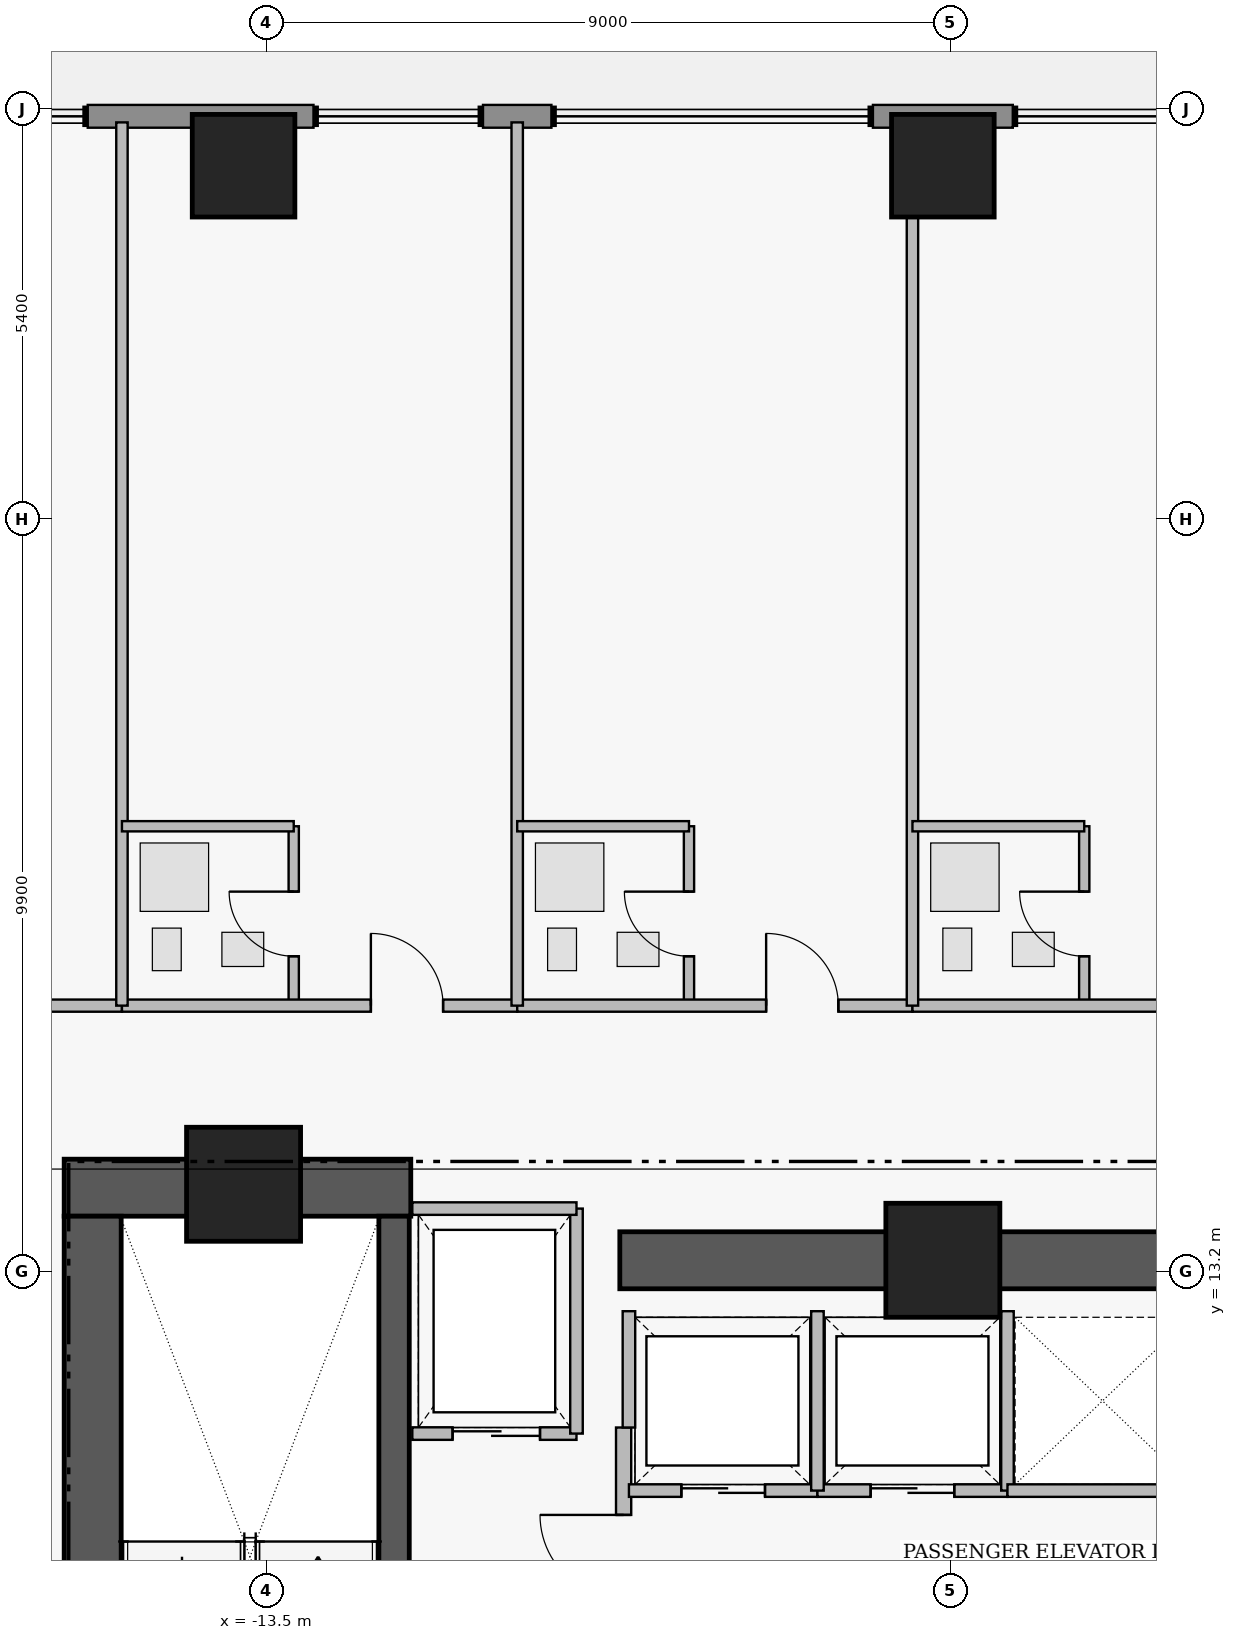
"""IFC4 building model, lengths in metres.
Left out: names, types, materials, properties, quantities, classifications, styles, units other than length and angle.
Written with IfcOpenShell. Run it as: python <this file> out.ifc"""

import sys

from ifc_helpers import new_model, si_unit, direction, frame, frame_2d, origin, origin_2d, place, context, subcontext, project, spatial, rectangle, extrude, element, fill, save


model = new_model("IFC4")
c1 = context("Model", 3, precision=1e-05, world=origin(), true_north=direction((0.0, 1.0)))
c2 = subcontext(c1, "Body", "Model", "MODEL_VIEW")
j1 = project(units=[si_unit("LENGTHUNIT", "METRE"), si_unit("PLANEANGLEUNIT", "RADIAN")], contexts=[c1])
p1 = place(None, origin())
s1 = spatial("IfcSite", under=j1, at=p1, CompositionType="ELEMENT")
p2 = place(p1, origin())
s2 = spatial("IfcBuilding", under=s1, at=p2, CompositionType="ELEMENT")
p3 = place(p2, frame((0.0, 0.0, 106.6)))
s3 = spatial("IfcBuildingStorey", under=s2, at=p3, CompositionType="ELEMENT", Elevation=106.6)
p4 = place(p3, frame((-16.16, 14.305, 0.0), z_axis=(0.0, 0.0, 1.0), x_axis=(1.0, 0.0, 0.0)))
e1 = element("IfcWall", 1, at=p4, inside=s3, PredefinedType="SHEAR", context=c2, shape_type="SweptSolid", body=[
    extrude(rectangle(XDim=4.56, YDim=0.75, at=frame_2d((2.28, 0.0))), origin(), (0.0, 0.0, 1.0), 3.46),
])
p5 = place(p3, frame((-15.785, 4.97, 0.0), z_axis=(0.0, 0.0, 1.0), x_axis=(0.0, 1.0, 0.0)))
e2 = element("IfcWall", 2, at=p5, inside=s3, PredefinedType="SHEAR", context=c2, shape_type="SweptSolid", body=[
    extrude(rectangle(XDim=8.96, YDim=0.75, at=frame_2d((4.48, 0.0))), origin(), (0.0, 0.0, 1.0), 3.46),
])
p6 = place(p3, frame((-8.85, 13.35, 0.0), z_axis=(0.0, 0.0, 1.0), x_axis=(1.0, 0.0, 0.0)))
e3 = element("IfcWall", 3, at=p6, inside=s3, PredefinedType="SHEAR", context=c2, shape_type="SweptSolid", body=[
    extrude(rectangle(XDim=7.6, YDim=0.75, at=frame_2d((3.8, 0.0))), origin(), (0.0, 0.0, 1.0), 3.43),
])
p7 = place(p3, frame((-11.82, 4.97, 0.0), z_axis=(0.0, 0.0, 1.0), x_axis=(0.0, 1.0, 0.0)))
e4 = element("IfcWall", 4, at=p7, inside=s3, PredefinedType="SHEAR", context=c2, shape_type="SweptSolid", body=[
    extrude(rectangle(XDim=8.96, YDim=0.4, at=frame_2d((4.48, 0.0))), origin(), (0.0, 0.0, 1.0), 3.46),
])
p8 = place(p7, frame((0.31, 0.0, 0.0)))
e5 = element("IfcOpeningElement", 5, at=p8, cuts=e4, PredefinedType="OPENING", context=c2, shape_type="SweptSolid", body=[
    extrude(rectangle(XDim=1.12, YDim=2.22, at=frame_2d((0.56, 1.11))), frame((0.0, 0.21, 0.0), z_axis=(0.0, -1.0, 0.0), x_axis=(1.0, 0.0, 0.0)), (0.0, 0.0, 1.0), 0.42),
])
for number, where, z_axis, x_axis in (
    (6, (-13.8, 14.35, 0.0), (0.0, 0.0, 1.0), (1.0, 0.0, 0.0)),
    (7, (-4.6, 13.35, 0.0), (0.0, 0.0, 1.0), (1.0, 0.0, 0.0)),
):
    element("IfcColumn", number, at=place(p3, frame(where, z_axis=z_axis, x_axis=x_axis)), inside=s3, PredefinedType="COLUMN", context=c2, shape_type="SweptSolid", body=[
        extrude(rectangle(XDim=1.5, YDim=1.5, at=origin_2d()), origin(), (0.0, 0.0, 1.0), 3.65),
    ])
for number, where, z_axis, x_axis in (
    (8, (-13.8, 27.75, 0.0), (0.0, 0.0, 1.0), (1.0, 0.0, 0.0)),
    (9, (-4.6, 27.75, 0.0), (0.0, 0.0, 1.0), (1.0, 0.0, 0.0)),
):
    element("IfcColumn", number, at=place(p3, frame(where, z_axis=z_axis, x_axis=x_axis)), inside=s3, PredefinedType="COLUMN", context=c2, shape_type="SweptSolid", body=[
        extrude(rectangle(XDim=1.35, YDim=1.35, at=origin_2d()), origin(), (0.0, 0.0, 1.0), 3.65),
    ])
p9 = place(p3, frame((-15.85, 28.4, 0.0), z_axis=(0.0, 0.0, 1.0), x_axis=(1.0, 0.0, 0.0)))
e10 = element("IfcWall", 10, at=p9, inside=s3, PredefinedType="STANDARD", context=c2, shape_type="SweptSolid", body=[
    extrude(rectangle(XDim=2.97, YDim=0.3, at=frame_2d((1.485, 0.0))), origin(), (0.0, 0.0, 1.0), 3.43),
])
p10 = place(p3, frame((-10.65, 28.4, 0.0), z_axis=(0.0, 0.0, 1.0), x_axis=(1.0, 0.0, 0.0)))
e11 = element("IfcWall", 11, at=p10, inside=s3, PredefinedType="STANDARD", context=c2, shape_type="SweptSolid", body=[
    extrude(rectangle(XDim=0.9, YDim=0.3, at=frame_2d((0.45, 0.0))), origin(), (0.0, 0.0, 1.0), 3.43),
])
p11 = place(p3, frame((-5.52, 28.4, 0.0), z_axis=(0.0, 0.0, 1.0), x_axis=(1.0, 0.0, 0.0)))
e12 = element("IfcWall", 12, at=p11, inside=s3, PredefinedType="STANDARD", context=c2, shape_type="SweptSolid", body=[
    extrude(rectangle(XDim=1.84, YDim=0.3, at=frame_2d((0.92, 0.0))), origin(), (0.0, 0.0, 1.0), 3.43),
])
p12 = place(p3, frame((-8.8, 5.05, 0.0), z_axis=(0.0, 0.0, 1.0), x_axis=(0.0, 1.0, 0.0)))
e13 = element("IfcWall", 13, at=p12, inside=s3, PredefinedType="PARTITIONING", context=c2, shape_type="SweptSolid", body=[
    extrude(rectangle(XDim=6.1, YDim=0.2, at=frame_2d((3.05, 0.0))), origin(), (0.0, 0.0, 1.0), 3.43),
])
p13 = place(p12, frame((0.25, 0.0, 0.0)))
e14 = element("IfcOpeningElement", 14, at=p13, cuts=e13, PredefinedType="OPENING", context=c2, shape_type="SweptSolid", body=[
    extrude(rectangle(XDim=1.1, YDim=2.2, at=frame_2d((0.55, 1.1))), frame((0.0, 0.11, 0.0), z_axis=(0.0, -1.0, 0.0), x_axis=(1.0, 0.0, 0.0)), (0.0, 0.0, 1.0), 0.22),
])
p14 = place(p12, frame((3.85, 0.0, 0.0)))
e15 = element("IfcOpeningElement", 15, at=p14, cuts=e13, PredefinedType="OPENING", context=c2, shape_type="SweptSolid", body=[
    extrude(rectangle(XDim=1.1, YDim=2.2, at=frame_2d((0.55, 1.1))), frame((0.0, 0.11, 0.0), z_axis=(0.0, -1.0, 0.0), x_axis=(1.0, 0.0, 0.0)), (0.0, 0.0, 1.0), 0.22),
])
p15 = place(p3, frame((-11.58, 11.07, 0.0), z_axis=(0.0, 0.0, 1.0), x_axis=(1.0, 0.0, 0.0)))
e16 = element("IfcWall", 16, at=p15, inside=s3, PredefinedType="PARTITIONING", context=c2, shape_type="SweptSolid", body=[
    extrude(rectangle(XDim=2.16, YDim=0.165, at=frame_2d((1.08, 0.0))), origin(), (0.0, 0.0, 1.0), 3.43),
])
p16 = place(p15, frame((0.53, 0.0, 0.0)))
e17 = element("IfcOpeningElement", 17, at=p16, cuts=e16, PredefinedType="OPENING", context=c2, shape_type="SweptSolid", body=[
    extrude(rectangle(XDim=1.15, YDim=2.25, at=frame_2d((0.575, 1.125))), frame((0.0, 0.093, 0.0), z_axis=(0.0, -1.0, 0.0), x_axis=(1.0, 0.0, 0.0)), (0.0, 0.0, 1.0), 0.185),
])
p17 = place(p3, frame((-8.73, 10.32, 0.0), z_axis=(0.0, 0.0, 1.0), x_axis=(1.0, 0.0, 0.0)))
e18 = element("IfcWall", 18, at=p17, inside=s3, PredefinedType="PARTITIONING", context=c2, shape_type="SweptSolid", body=[
    extrude(rectangle(XDim=2.48, YDim=0.165, at=frame_2d((1.24, 0.0))), origin(), (0.0, 0.0, 1.0), 3.43),
])
p18 = place(p17, frame((0.69, 0.0, 0.0)))
e19 = element("IfcOpeningElement", 19, at=p18, cuts=e18, PredefinedType="OPENING", context=c2, shape_type="SweptSolid", body=[
    extrude(rectangle(XDim=1.1, YDim=2.25, at=frame_2d((0.55, 1.125))), frame((0.0, 0.093, 0.0), z_axis=(0.0, -1.0, 0.0), x_axis=(1.0, 0.0, 0.0)), (0.0, 0.0, 1.0), 0.185),
])
p19 = place(p3, frame((-6.25, 10.32, 0.0), z_axis=(0.0, 0.0, 1.0), x_axis=(1.0, 0.0, 0.0)))
e20 = element("IfcWall", 20, at=p19, inside=s3, PredefinedType="PARTITIONING", context=c2, shape_type="SweptSolid", body=[
    extrude(rectangle(XDim=2.5, YDim=0.165, at=frame_2d((1.25, 0.0))), origin(), (0.0, 0.0, 1.0), 3.43),
])
p20 = place(p19, frame((0.7, 0.0, 0.0)))
e21 = element("IfcOpeningElement", 21, at=p20, cuts=e20, PredefinedType="OPENING", context=c2, shape_type="SweptSolid", body=[
    extrude(rectangle(XDim=1.1, YDim=2.25, at=frame_2d((0.55, 1.125))), frame((0.0, 0.093, 0.0), z_axis=(0.0, -1.0, 0.0), x_axis=(1.0, 0.0, 0.0)), (0.0, 0.0, 1.0), 0.185),
])
p21 = place(p3, frame((-20.6, 16.7, 0.0), z_axis=(0.0, 0.0, 1.0), x_axis=(1.0, 0.0, 0.0)))
e22 = element("IfcWall", 22, at=p21, inside=s3, PredefinedType="PARTITIONING", context=c2, shape_type="SweptSolid", body=[
    extrude(rectangle(XDim=5.2, YDim=0.16, at=frame_2d((2.6, 0.0))), origin(), (0.0, 0.0, 1.0), 3.43),
])
p22 = place(p21, frame((3.275, 0.0, 0.0)))
e23 = element("IfcOpeningElement", 23, at=p22, cuts=e22, PredefinedType="OPENING", context=c2, shape_type="SweptSolid", body=[
    extrude(rectangle(XDim=0.95, YDim=2.15, at=frame_2d((0.475, 1.075))), frame((0.0, 0.09, 0.0), z_axis=(0.0, -1.0, 0.0), x_axis=(1.0, 0.0, 0.0)), (0.0, 0.0, 1.0), 0.18),
])
p23 = place(p3, frame((-13.14, 16.7, 0.0), z_axis=(0.0, 0.0, 1.0), x_axis=(0.0, 1.0, 0.0)))
e24 = element("IfcWall", 24, at=p23, inside=s3, PredefinedType="PLUMBINGWALL", context=c2, shape_type="SweptSolid", body=[
    extrude(rectangle(XDim=2.36, YDim=0.135, at=frame_2d((1.18, 0.0))), origin(), (0.0, 0.0, 1.0), 3.43),
])
p24 = place(p23, frame((0.65, 0.0, 0.0)))
e25 = element("IfcOpeningElement", 25, at=p24, cuts=e24, PredefinedType="OPENING", context=c2, shape_type="SweptSolid", body=[
    extrude(rectangle(XDim=0.85, YDim=2.1, at=frame_2d((0.425, 1.05))), frame((0.0, 0.077, 0.0), z_axis=(0.0, -1.0, 0.0), x_axis=(1.0, 0.0, 0.0)), (0.0, 0.0, 1.0), 0.155),
])
p25 = place(p3, frame((-15.4, 16.7, 0.0), z_axis=(0.0, 0.0, 1.0), x_axis=(1.0, 0.0, 0.0)))
e26 = element("IfcWall", 26, at=p25, inside=s3, PredefinedType="PARTITIONING", context=c2, shape_type="SweptSolid", body=[
    extrude(rectangle(XDim=5.2, YDim=0.16, at=frame_2d((2.6, 0.0))), origin(), (0.0, 0.0, 1.0), 2.973),
])
p26 = place(p25, frame((3.275, 0.0, 0.0)))
e27 = element("IfcOpeningElement", 27, at=p26, cuts=e26, PredefinedType="OPENING", context=c2, shape_type="SweptSolid", body=[
    extrude(rectangle(XDim=0.95, YDim=2.15, at=frame_2d((0.475, 1.075))), frame((0.0, 0.09, 0.0), z_axis=(0.0, -1.0, 0.0), x_axis=(1.0, 0.0, 0.0)), (0.0, 0.0, 1.0), 0.18),
])
p27 = place(p3, frame((-7.94, 16.7, 0.0), z_axis=(0.0, 0.0, 1.0), x_axis=(0.0, 1.0, 0.0)))
e28 = element("IfcWall", 28, at=p27, inside=s3, PredefinedType="PLUMBINGWALL", context=c2, shape_type="SweptSolid", body=[
    extrude(rectangle(XDim=2.36, YDim=0.135, at=frame_2d((1.18, 0.0))), origin(), (0.0, 0.0, 1.0), 3.43),
])
p28 = place(p27, frame((0.65, 0.0, 0.0)))
e29 = element("IfcOpeningElement", 29, at=p28, cuts=e28, PredefinedType="OPENING", context=c2, shape_type="SweptSolid", body=[
    extrude(rectangle(XDim=0.85, YDim=2.1, at=frame_2d((0.425, 1.05))), frame((0.0, 0.077, 0.0), z_axis=(0.0, -1.0, 0.0), x_axis=(1.0, 0.0, 0.0)), (0.0, 0.0, 1.0), 0.155),
])
p29 = place(p3, frame((-10.2, 16.7, 0.0), z_axis=(0.0, 0.0, 1.0), x_axis=(1.0, 0.0, 0.0)))
e30 = element("IfcWall", 30, at=p29, inside=s3, PredefinedType="PARTITIONING", context=c2, shape_type="SweptSolid", body=[
    extrude(rectangle(XDim=5.2, YDim=0.16, at=frame_2d((2.6, 0.0))), origin(), (0.0, 0.0, 1.0), 2.973),
])
p30 = place(p29, frame((3.275, 0.0, 0.0)))
e31 = element("IfcOpeningElement", 31, at=p30, cuts=e30, PredefinedType="OPENING", context=c2, shape_type="SweptSolid", body=[
    extrude(rectangle(XDim=0.95, YDim=2.15, at=frame_2d((0.475, 1.075))), frame((0.0, 0.09, 0.0), z_axis=(0.0, -1.0, 0.0), x_axis=(1.0, 0.0, 0.0)), (0.0, 0.0, 1.0), 0.18),
])
p31 = place(p3, frame((-2.74, 16.7, 0.0), z_axis=(0.0, 0.0, 1.0), x_axis=(0.0, 1.0, 0.0)))
e32 = element("IfcWall", 32, at=p31, inside=s3, PredefinedType="PLUMBINGWALL", context=c2, shape_type="SweptSolid", body=[
    extrude(rectangle(XDim=2.36, YDim=0.135, at=frame_2d((1.18, 0.0))), origin(), (0.0, 0.0, 1.0), 3.43),
])
p32 = place(p31, frame((0.65, 0.0, 0.0)))
e33 = element("IfcOpeningElement", 33, at=p32, cuts=e32, PredefinedType="OPENING", context=c2, shape_type="SweptSolid", body=[
    extrude(rectangle(XDim=0.85, YDim=2.1, at=frame_2d((0.425, 1.05))), frame((0.0, 0.077, 0.0), z_axis=(0.0, -1.0, 0.0), x_axis=(1.0, 0.0, 0.0)), (0.0, 0.0, 1.0), 0.155),
])
p33 = place(p3, frame((-5.0, 16.7, 0.0), z_axis=(0.0, 0.0, 1.0), x_axis=(1.0, 0.0, 0.0)))
e34 = element("IfcWall", 34, at=p33, inside=s3, PredefinedType="PARTITIONING", context=c2, shape_type="SweptSolid", body=[
    extrude(rectangle(XDim=5.2, YDim=0.16, at=frame_2d((2.6, 0.0))), origin(), (0.0, 0.0, 1.0), 2.973),
])
p34 = place(p33, frame((3.275, 0.0, 0.0)))
e35 = element("IfcOpeningElement", 35, at=p34, cuts=e34, PredefinedType="OPENING", context=c2, shape_type="SweptSolid", body=[
    extrude(rectangle(XDim=0.95, YDim=2.15, at=frame_2d((0.475, 1.075))), frame((0.0, 0.09, 0.0), z_axis=(0.0, -1.0, 0.0), x_axis=(1.0, 0.0, 0.0)), (0.0, 0.0, 1.0), 0.18),
])
p35 = place(p3, frame((-9.42, 11.07, 0.0), z_axis=(0.0, 0.0, 1.0), x_axis=(0.0, 1.0, 0.0)))
e36 = element("IfcWall", 36, at=p35, inside=s3, PredefinedType="PARTITIONING", context=c2, shape_type="SweptSolid", body=[
    extrude(rectangle(XDim=2.96, YDim=0.165, at=frame_2d((1.48, 0.0))), origin(), (0.0, 0.0, 1.0), 3.43),
])
p36 = place(p3, frame((-11.58, 14.03, 0.0), z_axis=(0.0, 0.0, 1.0), x_axis=(1.0, 0.0, 0.0)))
e37 = element("IfcWall", 37, at=p36, inside=s3, PredefinedType="PARTITIONING", context=c2, shape_type="SweptSolid", body=[
    extrude(rectangle(XDim=2.16, YDim=0.165, at=frame_2d((1.08, 0.0))), origin(), (0.0, 0.0, 1.0), 3.43),
])
p37 = place(p3, frame((-8.73, 11.15, 0.0), z_axis=(0.0, 0.0, 1.0), x_axis=(0.0, 1.0, 0.0)))
e38 = element("IfcWall", 38, at=p37, inside=s3, PredefinedType="PARTITIONING", context=c2, shape_type="SweptSolid", body=[
    extrude(rectangle(XDim=1.53, YDim=0.165, at=frame_2d((0.765, 0.0))), origin(), (0.0, 0.0, 1.0), 3.43),
])
for number, where, z_axis, x_axis in (
    (39, (-6.25, 10.32, 0.0), (0.0, 0.0, 1.0), (0.0, 1.0, 0.0)),
    (40, (-3.75, 10.32, 0.0), (0.0, 0.0, 1.0), (0.0, 1.0, 0.0)),
):
    element("IfcWall", number, at=place(p3, frame(where, z_axis=z_axis, x_axis=x_axis)), inside=s3, PredefinedType="PARTITIONING", context=c2, shape_type="SweptSolid", body=[
        extrude(rectangle(XDim=2.36, YDim=0.165, at=frame_2d((1.18, 0.0))), origin(), (0.0, 0.0, 1.0), 3.43),
    ])
p38 = place(p3, frame((-3.75, 10.32, 0.0), z_axis=(0.0, 0.0, 1.0), x_axis=(1.0, 0.0, 0.0)))
e41 = element("IfcWall", 41, at=p38, inside=s3, PredefinedType="PARTITIONING", context=c2, shape_type="SweptSolid", body=[
    extrude(rectangle(XDim=2.48, YDim=0.165, at=frame_2d((1.24, 0.0))), origin(), (0.0, 0.0, 1.0), 3.43),
])
p39 = place(p3, frame((-15.4, 16.7, 0.0), z_axis=(0.0, 0.0, 1.0), x_axis=(0.0, 1.0, 0.0)))
e42 = element("IfcWall", 42, at=p39, inside=s3, PredefinedType="PARTITIONING", context=c2, shape_type="SweptSolid", body=[
    extrude(rectangle(XDim=11.62, YDim=0.15, at=frame_2d((5.81, 0.0))), origin(), (0.0, 0.0, 1.0), 3.43),
])
p40 = place(p3, frame((-15.4, 19.06, 0.0), z_axis=(0.0, 0.0, 1.0), x_axis=(1.0, 0.0, 0.0)))
e43 = element("IfcWall", 43, at=p40, inside=s3, PredefinedType="PLUMBINGWALL", context=c2, shape_type="SweptSolid", body=[
    extrude(rectangle(XDim=2.26, YDim=0.135, at=frame_2d((1.13, 0.0))), origin(), (0.0, 0.0, 1.0), 2.973),
])
p41 = place(p3, frame((-10.2, 16.7, 0.0), z_axis=(0.0, 0.0, 1.0), x_axis=(0.0, 1.0, 0.0)))
e44 = element("IfcWall", 44, at=p41, inside=s3, PredefinedType="PARTITIONING", context=c2, shape_type="SweptSolid", body=[
    extrude(rectangle(XDim=11.62, YDim=0.15, at=frame_2d((5.81, 0.0))), origin(), (0.0, 0.0, 1.0), 3.43),
])
p42 = place(p3, frame((-10.2, 19.06, 0.0), z_axis=(0.0, 0.0, 1.0), x_axis=(1.0, 0.0, 0.0)))
e45 = element("IfcWall", 45, at=p42, inside=s3, PredefinedType="PLUMBINGWALL", context=c2, shape_type="SweptSolid", body=[
    extrude(rectangle(XDim=2.26, YDim=0.135, at=frame_2d((1.13, 0.0))), origin(), (0.0, 0.0, 1.0), 2.973),
])
p43 = place(p3, frame((-5.0, 16.7, 0.0), z_axis=(0.0, 0.0, 1.0), x_axis=(0.0, 1.0, 0.0)))
e46 = element("IfcWall", 46, at=p43, inside=s3, PredefinedType="PARTITIONING", context=c2, shape_type="SweptSolid", body=[
    extrude(rectangle(XDim=11.62, YDim=0.15, at=frame_2d((5.81, 0.0))), origin(), (0.0, 0.0, 1.0), 2.503),
])
p44 = place(p3, frame((-5.0, 19.06, 0.0), z_axis=(0.0, 0.0, 1.0), x_axis=(1.0, 0.0, 0.0)))
e47 = element("IfcWall", 47, at=p44, inside=s3, PredefinedType="PLUMBINGWALL", context=c2, shape_type="SweptSolid", body=[
    extrude(rectangle(XDim=2.26, YDim=0.135, at=frame_2d((1.13, 0.0))), origin(), (0.0, 0.0, 1.0), 2.973),
])
p45 = place(p14, origin())
e48 = element("IfcDoor", 48, at=p45, inside=s3, OperationType="SINGLE_SWING_RIGHT", PredefinedType="DOOR", context=c2, shape_type="SweptSolid", body=[
    extrude(rectangle(XDim=1.1, YDim=2.2, at=frame_2d((0.55, 1.1))), frame((0.0, 0.025, 0.0), z_axis=(0.0, -1.0, 0.0), x_axis=(1.0, 0.0, 0.0)), (0.0, 0.0, 1.0), 0.05),
])
fill(e15, e48)
p46 = place(p16, origin())
e49 = element("IfcDoor", 49, at=p46, inside=s3, OperationType="SLIDING_TO_LEFT", PredefinedType="DOOR", context=c2, shape_type="SweptSolid", body=[
    extrude(rectangle(XDim=1.15, YDim=2.25, at=frame_2d((0.575, 1.125))), frame((0.0, 0.025, 0.0), z_axis=(0.0, -1.0, 0.0), x_axis=(1.0, 0.0, 0.0)), (0.0, 0.0, 1.0), 0.05),
])
fill(e17, e49)
p47 = place(p18, origin())
e50 = element("IfcDoor", 50, at=p47, inside=s3, OperationType="SLIDING_TO_LEFT", PredefinedType="DOOR", context=c2, shape_type="SweptSolid", body=[
    extrude(rectangle(XDim=1.1, YDim=2.25, at=frame_2d((0.55, 1.125))), frame((0.0, 0.025, 0.0), z_axis=(0.0, -1.0, 0.0), x_axis=(1.0, 0.0, 0.0)), (0.0, 0.0, 1.0), 0.05),
])
fill(e19, e50)
p48 = place(p20, origin())
e51 = element("IfcDoor", 51, at=p48, inside=s3, OperationType="SLIDING_TO_LEFT", PredefinedType="DOOR", context=c2, shape_type="SweptSolid", body=[
    extrude(rectangle(XDim=1.1, YDim=2.25, at=frame_2d((0.55, 1.125))), frame((0.0, 0.025, 0.0), z_axis=(0.0, -1.0, 0.0), x_axis=(1.0, 0.0, 0.0)), (0.0, 0.0, 1.0), 0.05),
])
fill(e21, e51)
p49 = place(p24, origin())
e52 = element("IfcDoor", 52, at=p49, inside=s3, OperationType="SINGLE_SWING_RIGHT", PredefinedType="DOOR", context=c2, shape_type="SweptSolid", body=[
    extrude(rectangle(XDim=0.85, YDim=2.1, at=frame_2d((0.425, 1.05))), frame((0.0, 0.025, 0.0), z_axis=(0.0, -1.0, 0.0), x_axis=(1.0, 0.0, 0.0)), (0.0, 0.0, 1.0), 0.05),
])
fill(e25, e52)
p50 = place(p26, origin())
e53 = element("IfcDoor", 53, at=p50, inside=s3, OperationType="SINGLE_SWING_LEFT", PredefinedType="DOOR", context=c2, shape_type="SweptSolid", body=[
    extrude(rectangle(XDim=0.95, YDim=2.15, at=frame_2d((0.475, 1.075))), frame((0.0, 0.025, 0.0), z_axis=(0.0, -1.0, 0.0), x_axis=(1.0, 0.0, 0.0)), (0.0, 0.0, 1.0), 0.05),
])
fill(e27, e53)
p51 = place(p28, origin())
e54 = element("IfcDoor", 54, at=p51, inside=s3, OperationType="SINGLE_SWING_RIGHT", PredefinedType="DOOR", context=c2, shape_type="SweptSolid", body=[
    extrude(rectangle(XDim=0.85, YDim=2.1, at=frame_2d((0.425, 1.05))), frame((0.0, 0.025, 0.0), z_axis=(0.0, -1.0, 0.0), x_axis=(1.0, 0.0, 0.0)), (0.0, 0.0, 1.0), 0.05),
])
fill(e29, e54)
p52 = place(p30, origin())
e55 = element("IfcDoor", 55, at=p52, inside=s3, OperationType="SINGLE_SWING_LEFT", PredefinedType="DOOR", context=c2, shape_type="SweptSolid", body=[
    extrude(rectangle(XDim=0.95, YDim=2.15, at=frame_2d((0.475, 1.075))), frame((0.0, 0.025, 0.0), z_axis=(0.0, -1.0, 0.0), x_axis=(1.0, 0.0, 0.0)), (0.0, 0.0, 1.0), 0.05),
])
fill(e31, e55)
p53 = place(p32, origin())
e56 = element("IfcDoor", 56, at=p53, inside=s3, OperationType="SINGLE_SWING_RIGHT", PredefinedType="DOOR", context=c2, shape_type="SweptSolid", body=[
    extrude(rectangle(XDim=0.85, YDim=2.1, at=frame_2d((0.425, 1.05))), frame((0.0, 0.025, 0.0), z_axis=(0.0, -1.0, 0.0), x_axis=(1.0, 0.0, 0.0)), (0.0, 0.0, 1.0), 0.05),
])
fill(e33, e56)
save(model, sys.argv[1])
